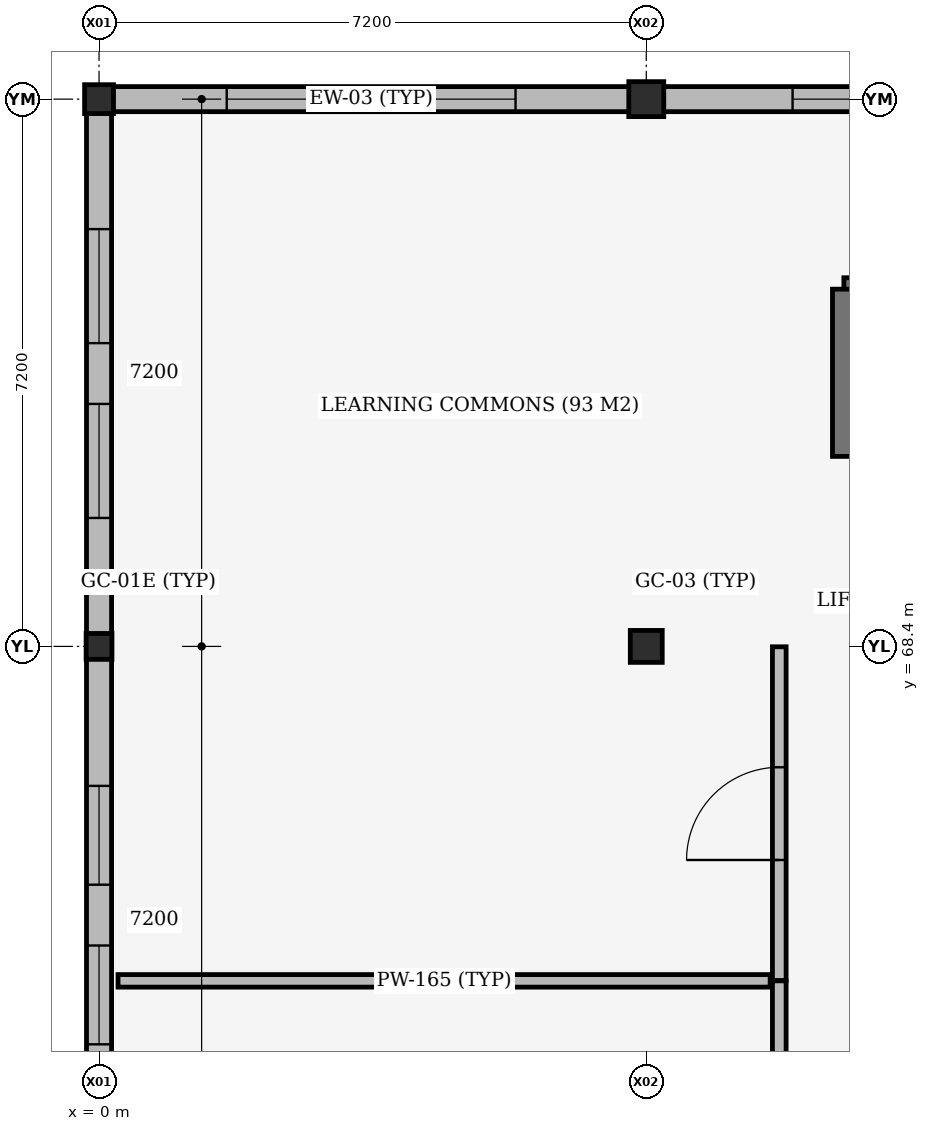
"""IFC4 building model, lengths in metres.
Left out: names, types, materials, properties, quantities, classifications, styles, units other than length and angle.
Written with IfcOpenShell. Run it as: python <this file> out.ifc"""

import sys

from ifc_helpers import new_model, si_unit, direction, frame, frame_2d, origin, origin_2d, place, context, subcontext, project, spatial, rectangle, extrude, element, fill, save


model = new_model("IFC4")
c1 = context("Model", 3, precision=1e-05, world=origin(), true_north=direction((0.0, 1.0)))
c2 = subcontext(c1, "Body", "Model", "MODEL_VIEW")
j1 = project(units=[si_unit("LENGTHUNIT", "METRE"), si_unit("PLANEANGLEUNIT", "RADIAN")], contexts=[c1])
p1 = place(None, origin())
s1 = spatial("IfcSite", under=j1, at=p1, CompositionType="ELEMENT")
p2 = place(p1, origin())
s2 = spatial("IfcBuilding", under=s1, at=p2, CompositionType="ELEMENT")
p3 = place(p2, frame((0.0, 0.0, 18.0)))
s3 = spatial("IfcBuildingStorey", under=s2, at=p3, CompositionType="ELEMENT", Elevation=18.0)
p4 = place(p3, frame((0.0, 68.4, 0.0), z_axis=(0.0, 0.0, 1.0), x_axis=(1.0, 0.0, 0.0)))
e1 = element("IfcColumn", 1, at=p4, inside=s3, PredefinedType="COLUMN", context=c2, shape_type="SweptSolid", body=[
    extrude(rectangle(XDim=0.34, YDim=0.34, at=origin_2d()), origin(), (0.0, 0.0, 1.0), 3.96),
])
p5 = place(p3, frame((0.0, 75.6, 0.0), z_axis=(0.0, 0.0, 1.0), x_axis=(1.0, 0.0, 0.0)))
e2 = element("IfcColumn", 2, at=p5, inside=s3, PredefinedType="COLUMN", context=c2, shape_type="SweptSolid", body=[
    extrude(rectangle(XDim=0.38, YDim=0.38, at=origin_2d()), origin(), (0.0, 0.0, 1.0), 3.96),
])
p6 = place(p3, frame((7.2, 68.4, 0.0), z_axis=(0.0, 0.0, 1.0), x_axis=(1.0, 0.0, 0.0)))
e3 = element("IfcColumn", 3, at=p6, inside=s3, PredefinedType="COLUMN", context=c2, shape_type="SweptSolid", body=[
    extrude(rectangle(XDim=0.42, YDim=0.42, at=origin_2d()), origin(), (0.0, 0.0, 1.0), 3.96),
])
p7 = place(p3, frame((7.2, 75.6, 0.0), z_axis=(0.0, 0.0, 1.0), x_axis=(1.0, 0.0, 0.0)))
e4 = element("IfcColumn", 4, at=p7, inside=s3, PredefinedType="COLUMN", context=c2, shape_type="SweptSolid", body=[
    extrude(rectangle(XDim=0.46, YDim=0.46, at=origin_2d()), origin(), (0.0, 0.0, 1.0), 3.96),
])
p8 = place(p3, frame((11.8, 73.1, 0.0), z_axis=(0.0, 0.0, 1.0), x_axis=(-1.0, 0.0, 0.0)))
e5 = element("IfcWall", 5, at=p8, inside=s3, PredefinedType="SHEAR", context=c2, shape_type="SweptSolid", body=[
    extrude(rectangle(XDim=2.0, YDim=0.3, at=frame_2d((1.0, 0.0))), origin(), (0.0, 0.0, 1.0), 4.86),
])
p9 = place(p3, frame((9.8, 73.1, 0.0), z_axis=(0.0, 0.0, 1.0), x_axis=(0.0, -1.0, 0.0)))
e6 = element("IfcWall", 6, at=p9, inside=s3, PredefinedType="SHEAR", context=c2, shape_type="SweptSolid", body=[
    extrude(rectangle(XDim=2.2, YDim=0.3, at=frame_2d((1.1, 0.0))), origin(), (0.0, 0.0, 1.0), 4.86),
])
p10 = place(p3, frame((0.182, 75.6, 0.0), z_axis=(0.0, 0.0, 1.0), x_axis=(1.0, 0.0, 0.0)))
e7 = element("IfcWall", 7, at=p10, inside=s3, PredefinedType="STANDARD", context=c2, shape_type="SweptSolid", body=[
    extrude(rectangle(XDim=6.796, YDim=0.33, at=frame_2d((3.398, 0.0))), origin(), (0.0, 0.0, 1.0), 3.935),
])
p11 = place(p10, frame((1.498, 0.0, 0.95)))
e8 = element("IfcOpeningElement", 8, at=p11, cuts=e7, PredefinedType="OPENING", context=c2, shape_type="SweptSolid", body=[
    extrude(rectangle(XDim=1.5, YDim=1.8, at=frame_2d((0.75, 0.9))), frame((0.0, 0.175, 0.0), z_axis=(0.0, -1.0, 0.0), x_axis=(1.0, 0.0, 0.0)), (0.0, 0.0, 1.0), 0.35),
])
p12 = place(p10, frame((3.798, 0.0, 0.95)))
e9 = element("IfcOpeningElement", 9, at=p12, cuts=e7, PredefinedType="OPENING", context=c2, shape_type="SweptSolid", body=[
    extrude(rectangle(XDim=1.5, YDim=1.8, at=frame_2d((0.75, 0.9))), frame((0.0, 0.175, 0.0), z_axis=(0.0, -1.0, 0.0), x_axis=(1.0, 0.0, 0.0)), (0.0, 0.0, 1.0), 0.35),
])
p13 = place(p3, frame((7.422, 75.6, 0.0), z_axis=(0.0, 0.0, 1.0), x_axis=(1.0, 0.0, 0.0)))
e10 = element("IfcWall", 10, at=p13, inside=s3, PredefinedType="STANDARD", context=c2, shape_type="SweptSolid", body=[
    extrude(rectangle(XDim=6.806, YDim=0.33, at=frame_2d((3.403, 0.0))), origin(), (0.0, 0.0, 1.0), 3.935),
])
p14 = place(p13, frame((1.703, 0.0, 0.95)))
e11 = element("IfcOpeningElement", 11, at=p14, cuts=e10, PredefinedType="OPENING", context=c2, shape_type="SweptSolid", body=[
    extrude(rectangle(XDim=1.3, YDim=1.8, at=frame_2d((0.65, 0.9))), frame((0.0, 0.175, 0.0), z_axis=(0.0, -1.0, 0.0), x_axis=(1.0, 0.0, 0.0)), (0.0, 0.0, 1.0), 0.35),
])
p15 = place(p13, frame((3.803, 0.0, 0.95)))
e12 = element("IfcOpeningElement", 12, at=p15, cuts=e10, PredefinedType="OPENING", context=c2, shape_type="SweptSolid", body=[
    extrude(rectangle(XDim=1.3, YDim=1.8, at=frame_2d((0.65, 0.9))), frame((0.0, 0.175, 0.0), z_axis=(0.0, -1.0, 0.0), x_axis=(1.0, 0.0, 0.0)), (0.0, 0.0, 1.0), 0.35),
])
p16 = place(p3, frame((0.0, 61.492, 0.0), z_axis=(0.0, 0.0, 1.0), x_axis=(0.0, 1.0, 0.0)))
e13 = element("IfcWall", 13, at=p16, inside=s3, PredefinedType="STANDARD", context=c2, shape_type="SweptSolid", body=[
    extrude(rectangle(XDim=6.746, YDim=0.33, at=frame_2d((3.373, 0.0))), origin(), (0.0, 0.0, 1.0), 3.935),
])
p17 = place(p16, frame((1.673, 0.0, 0.95)))
e14 = element("IfcOpeningElement", 14, at=p17, cuts=e13, PredefinedType="OPENING", context=c2, shape_type="SweptSolid", body=[
    extrude(rectangle(XDim=1.3, YDim=1.8, at=frame_2d((0.65, 0.9))), frame((0.0, 0.175, 0.0), z_axis=(0.0, -1.0, 0.0), x_axis=(1.0, 0.0, 0.0)), (0.0, 0.0, 1.0), 0.35),
])
p18 = place(p16, frame((3.773, 0.0, 0.95)))
e15 = element("IfcOpeningElement", 15, at=p18, cuts=e13, PredefinedType="OPENING", context=c2, shape_type="SweptSolid", body=[
    extrude(rectangle(XDim=1.3, YDim=1.8, at=frame_2d((0.65, 0.9))), frame((0.0, 0.175, 0.0), z_axis=(0.0, -1.0, 0.0), x_axis=(1.0, 0.0, 0.0)), (0.0, 0.0, 1.0), 0.35),
])
p19 = place(p3, frame((0.0, 68.562, 0.0), z_axis=(0.0, 0.0, 1.0), x_axis=(0.0, 1.0, 0.0)))
e16 = element("IfcWall", 16, at=p19, inside=s3, PredefinedType="STANDARD", context=c2, shape_type="SweptSolid", body=[
    extrude(rectangle(XDim=6.856, YDim=0.33, at=frame_2d((3.428, 0.0))), origin(), (0.0, 0.0, 1.0), 3.935),
])
p20 = place(p19, frame((1.528, 0.0, 0.95)))
e17 = element("IfcOpeningElement", 17, at=p20, cuts=e16, PredefinedType="OPENING", context=c2, shape_type="SweptSolid", body=[
    extrude(rectangle(XDim=1.5, YDim=1.8, at=frame_2d((0.75, 0.9))), frame((0.0, 0.175, 0.0), z_axis=(0.0, -1.0, 0.0), x_axis=(1.0, 0.0, 0.0)), (0.0, 0.0, 1.0), 0.35),
])
p21 = place(p19, frame((3.828, 0.0, 0.95)))
e18 = element("IfcOpeningElement", 18, at=p21, cuts=e16, PredefinedType="OPENING", context=c2, shape_type="SweptSolid", body=[
    extrude(rectangle(XDim=1.5, YDim=1.8, at=frame_2d((0.75, 0.9))), frame((0.0, 0.175, 0.0), z_axis=(0.0, -1.0, 0.0), x_axis=(1.0, 0.0, 0.0)), (0.0, 0.0, 1.0), 0.35),
])
p22 = place(p3, frame((8.95, 54.965, 0.0), z_axis=(0.0, 0.0, 1.0), x_axis=(0.0, 1.0, 0.0)))
e19 = element("IfcWall", 19, at=p22, inside=s3, PredefinedType="PARTITIONING", context=c2, shape_type="SweptSolid", body=[
    extrude(rectangle(XDim=9.035, YDim=0.18, at=frame_2d((4.518, 0.0))), origin(), (0.0, 0.0, 1.0), 3.195),
])
p23 = place(p22, frame((3.897, 0.0, 0.0)))
e20 = element("IfcOpeningElement", 20, at=p23, cuts=e19, PredefinedType="OPENING", context=c2, shape_type="SweptSolid", body=[
    extrude(rectangle(XDim=1.24, YDim=2.25, at=frame_2d((0.62, 1.125))), frame((0.0, 0.1, 0.0), z_axis=(0.0, -1.0, 0.0), x_axis=(1.0, 0.0, 0.0)), (0.0, 0.0, 1.0), 0.2),
])
p24 = place(p3, frame((0.25, 64.0, 0.0), z_axis=(0.0, 0.0, 1.0), x_axis=(1.0, 0.0, 0.0)))
e21 = element("IfcWall", 21, at=p24, inside=s3, PredefinedType="PARTITIONING", context=c2, shape_type="SweptSolid", body=[
    extrude(rectangle(XDim=8.58, YDim=0.165, at=frame_2d((4.29, 0.0))), origin(), (0.0, 0.0, 1.0), 3.935),
])
p25 = place(p3, frame((8.95, 64.005, 0.0), z_axis=(0.0, 0.0, 1.0), x_axis=(0.0, 1.0, 0.0)))
e22 = element("IfcWall", 22, at=p25, inside=s3, PredefinedType="PARTITIONING", context=c2, shape_type="SweptSolid", body=[
    extrude(rectangle(XDim=4.39, YDim=0.18, at=frame_2d((2.195, 0.0))), origin(), (0.0, 0.0, 1.0), 3.935),
])
p26 = place(p25, frame((1.585, 0.0, 0.0)))
e23 = element("IfcOpeningElement", 23, at=p26, cuts=e22, PredefinedType="OPENING", context=c2, shape_type="SweptSolid", body=[
    extrude(rectangle(XDim=1.22, YDim=2.25, at=frame_2d((0.61, 1.125))), frame((0.0, 0.1, 0.0), z_axis=(0.0, -1.0, 0.0), x_axis=(1.0, 0.0, 0.0)), (0.0, 0.0, 1.0), 0.2),
])
p27 = place(p11, origin())
e24 = element("IfcWindow", 24, at=p27, inside=s3, PartitioningType="DOUBLE_PANEL_VERTICAL", PredefinedType="WINDOW", context=c2, shape_type="SweptSolid", body=[
    extrude(rectangle(XDim=1.5, YDim=1.8, at=frame_2d((0.75, 0.9))), frame((0.0, 0.03, 0.0), z_axis=(0.0, -1.0, 0.0), x_axis=(1.0, 0.0, 0.0)), (0.0, 0.0, 1.0), 0.06),
])
fill(e8, e24)
p28 = place(p12, origin())
e25 = element("IfcWindow", 25, at=p28, inside=s3, PartitioningType="DOUBLE_PANEL_VERTICAL", PredefinedType="WINDOW", context=c2, shape_type="SweptSolid", body=[
    extrude(rectangle(XDim=1.5, YDim=1.8, at=frame_2d((0.75, 0.9))), frame((0.0, 0.03, 0.0), z_axis=(0.0, -1.0, 0.0), x_axis=(1.0, 0.0, 0.0)), (0.0, 0.0, 1.0), 0.06),
])
fill(e9, e25)
p29 = place(p14, origin())
e26 = element("IfcWindow", 26, at=p29, inside=s3, PartitioningType="DOUBLE_PANEL_VERTICAL", PredefinedType="WINDOW", context=c2, shape_type="SweptSolid", body=[
    extrude(rectangle(XDim=1.3, YDim=1.8, at=frame_2d((0.65, 0.9))), frame((0.0, 0.03, 0.0), z_axis=(0.0, -1.0, 0.0), x_axis=(1.0, 0.0, 0.0)), (0.0, 0.0, 1.0), 0.06),
])
fill(e11, e26)
p30 = place(p17, origin())
e27 = element("IfcWindow", 27, at=p30, inside=s3, PartitioningType="DOUBLE_PANEL_VERTICAL", PredefinedType="WINDOW", context=c2, shape_type="SweptSolid", body=[
    extrude(rectangle(XDim=1.3, YDim=1.8, at=frame_2d((0.65, 0.9))), frame((0.0, 0.03, 0.0), z_axis=(0.0, -1.0, 0.0), x_axis=(1.0, 0.0, 0.0)), (0.0, 0.0, 1.0), 0.06),
])
fill(e14, e27)
p31 = place(p18, origin())
e28 = element("IfcWindow", 28, at=p31, inside=s3, PartitioningType="DOUBLE_PANEL_VERTICAL", PredefinedType="WINDOW", context=c2, shape_type="SweptSolid", body=[
    extrude(rectangle(XDim=1.3, YDim=1.8, at=frame_2d((0.65, 0.9))), frame((0.0, 0.03, 0.0), z_axis=(0.0, -1.0, 0.0), x_axis=(1.0, 0.0, 0.0)), (0.0, 0.0, 1.0), 0.06),
])
fill(e15, e28)
p32 = place(p20, origin())
e29 = element("IfcWindow", 29, at=p32, inside=s3, PartitioningType="DOUBLE_PANEL_VERTICAL", PredefinedType="WINDOW", context=c2, shape_type="SweptSolid", body=[
    extrude(rectangle(XDim=1.5, YDim=1.8, at=frame_2d((0.75, 0.9))), frame((0.0, 0.03, 0.0), z_axis=(0.0, -1.0, 0.0), x_axis=(1.0, 0.0, 0.0)), (0.0, 0.0, 1.0), 0.06),
])
fill(e17, e29)
p33 = place(p21, origin())
e30 = element("IfcWindow", 30, at=p33, inside=s3, PartitioningType="DOUBLE_PANEL_VERTICAL", PredefinedType="WINDOW", context=c2, shape_type="SweptSolid", body=[
    extrude(rectangle(XDim=1.5, YDim=1.8, at=frame_2d((0.75, 0.9))), frame((0.0, 0.03, 0.0), z_axis=(0.0, -1.0, 0.0), x_axis=(1.0, 0.0, 0.0)), (0.0, 0.0, 1.0), 0.06),
])
fill(e18, e30)
p34 = place(p26, origin())
e31 = element("IfcDoor", 31, at=p34, inside=s3, OperationType="SINGLE_SWING_LEFT", PredefinedType="DOOR", context=c2, shape_type="SweptSolid", body=[
    extrude(rectangle(XDim=1.22, YDim=2.25, at=frame_2d((0.61, 1.125))), frame((0.0, 0.025, 0.0), z_axis=(0.0, -1.0, 0.0), x_axis=(1.0, 0.0, 0.0)), (0.0, 0.0, 1.0), 0.05),
])
fill(e23, e31)
save(model, sys.argv[1])
